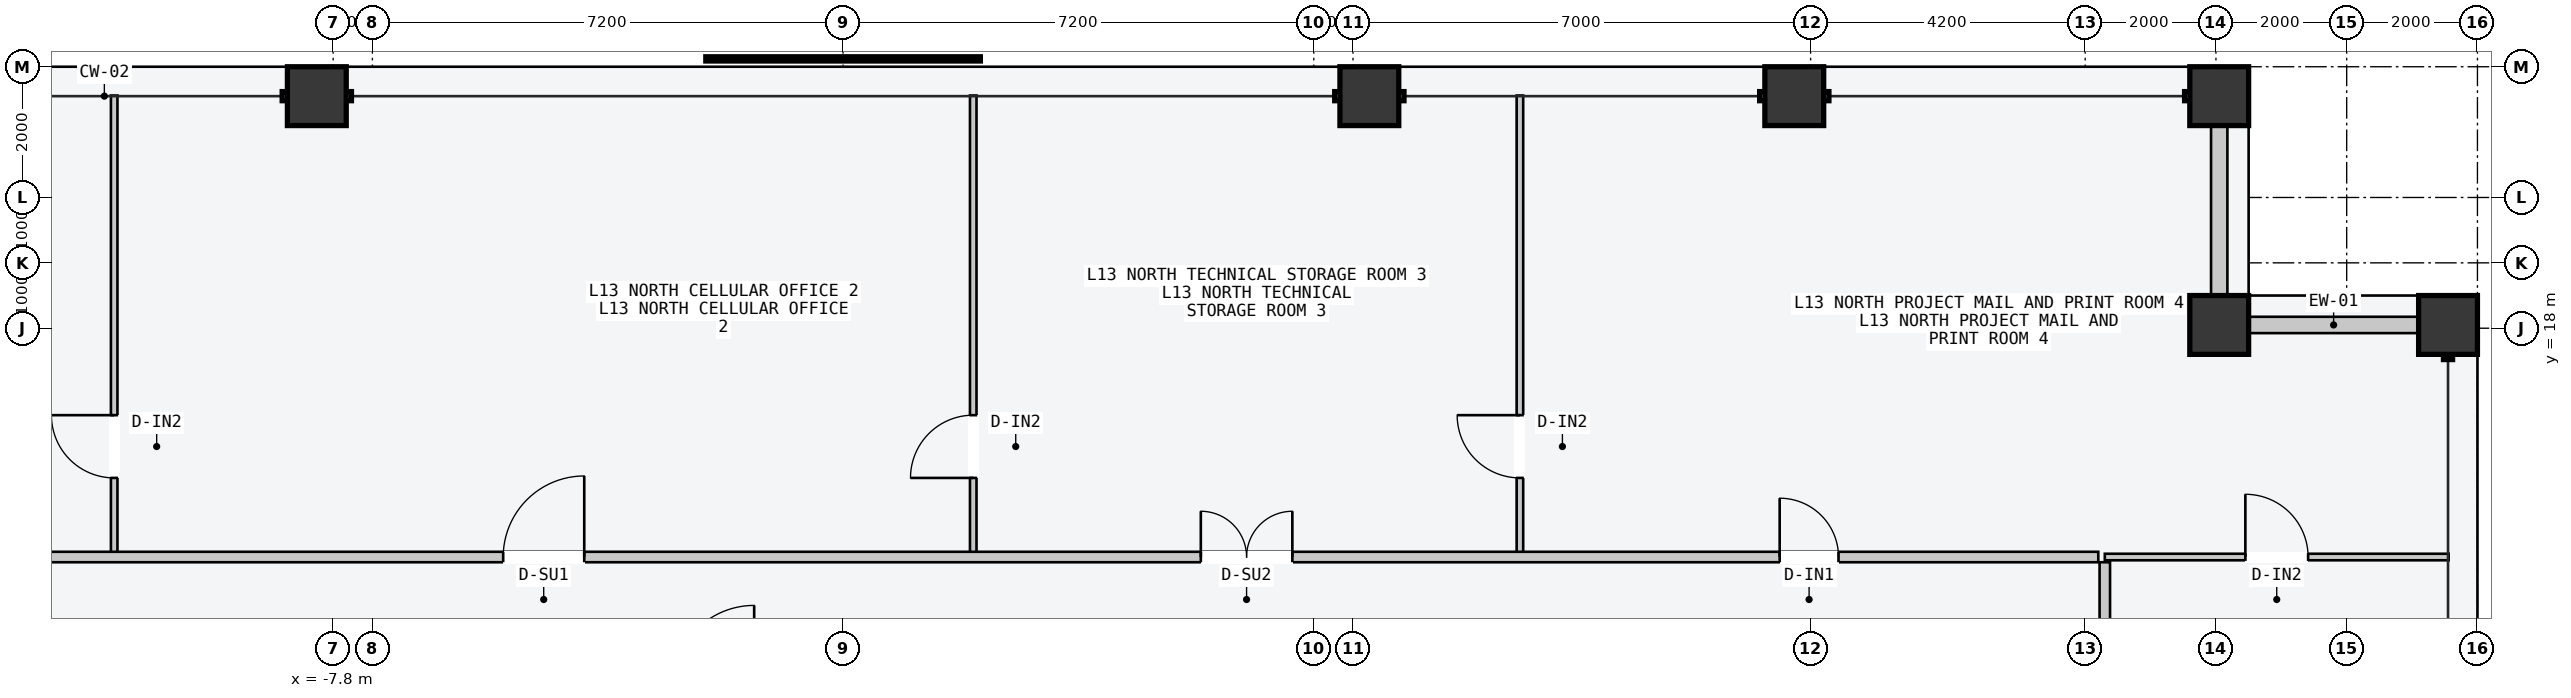
"""IFC4 building model, lengths in metres.
Left out: names, types, materials, properties, quantities, classifications, styles, units other than length and angle.
Written with IfcOpenShell. Run it as: python <this file> out.ifc"""

import sys

from ifc_helpers import new_model, si_unit, direction, frame, frame_2d, origin, origin_2d, place, context, subcontext, project, spatial, rectangle, hollow_rectangle, extrude, element, fill, save


model = new_model("IFC4")
c1 = context("Model", 3, precision=1e-05, world=origin(), true_north=direction((0.0, 1.0)))
c2 = subcontext(c1, "Body", "Model", "MODEL_VIEW")
j1 = project(units=[si_unit("LENGTHUNIT", "METRE"), si_unit("PLANEANGLEUNIT", "RADIAN")], contexts=[c1])
p1 = place(None, origin())
s1 = spatial("IfcSite", under=j1, at=p1, CompositionType="ELEMENT")
p2 = place(p1, origin())
s2 = spatial("IfcBuilding", under=s1, at=p2, CompositionType="ELEMENT")
p3 = place(p2, frame((0.0, 0.0, 52.8)))
s3 = spatial("IfcBuildingStorey", under=s2, at=p3, CompositionType="ELEMENT", Elevation=52.8)
for number, where, z_axis, x_axis in (
    (1, (-8.05, 21.55, 0.0), (0.0, 0.0, 1.0), (1.0, 0.0, 0.0)),
    (2, (8.05, 21.55, 0.0), (0.0, 0.0, 1.0), (1.0, 0.0, 0.0)),
    (3, (14.55, 21.55, 0.0), (0.0, 0.0, 1.0), (1.0, 0.0, 0.0)),
    (4, (21.05, 21.55, 0.0), (0.0, 0.0, 1.0), (1.0, 0.0, 0.0)),
    (5, (24.55, 18.05, 0.0), (0.0, 0.0, 1.0), (0.0, 1.0, 0.0)),
    (6, (21.05, 18.05, 0.0), (0.0, 0.0, 1.0), (1.0, 0.0, 0.0)),
):
    element("IfcColumn", number, at=place(p3, frame(where, z_axis=z_axis, x_axis=x_axis)), inside=s3, PredefinedType="COLUMN", context=c2, shape_type="SweptSolid", body=[
        extrude(hollow_rectangle(XDim=0.9, YDim=0.9, WallThickness=0.045, at=origin_2d()), origin(), (0.0, 0.0, 1.0), 3.6),
    ])
for number, where, z_axis, x_axis in (
    (7, (21.51, 18.05, 0.0), (0.0, 0.0, 1.0), (1.0, 0.0, 0.0)),
    (8, (21.05, 18.51, 0.0), (0.0, 0.0, 1.0), (0.0, 1.0, 0.0)),
):
    element("IfcWall", number, at=place(p3, frame(where, z_axis=z_axis, x_axis=x_axis)), inside=s3, PredefinedType="STANDARD", context=c2, shape_type="SweptSolid", body=[
        extrude(rectangle(XDim=2.58, YDim=0.25, at=frame_2d((1.29, 0.0))), origin(), (0.0, 0.0, 1.0), 2.7),
    ])
p4 = place(p3, frame((-11.15, 14.56, 0.0), z_axis=(0.0, 0.0, 1.0), x_axis=(0.0, 1.0, 0.0)))
e9 = element("IfcWall", 9, at=p4, inside=s3, PredefinedType="PARTITIONING", context=c2, shape_type="SweptSolid", body=[
    extrude(rectangle(XDim=7.0, YDim=0.1, at=frame_2d((3.5, 0.0))), origin(), (0.0, 0.0, 1.0), 3.4),
])
p5 = place(p4, frame((1.15, 0.0, 0.0)))
e10 = element("IfcOpeningElement", 10, at=p5, cuts=e9, PredefinedType="OPENING", context=c2, shape_type="SweptSolid", body=[
    extrude(rectangle(XDim=0.96, YDim=2.18, at=frame_2d((0.48, 1.09))), frame((0.0, 0.06, 0.0), z_axis=(0.0, -1.0, 0.0), x_axis=(1.0, 0.0, 0.0)), (0.0, 0.0, 1.0), 0.12),
])
p6 = place(p3, frame((1.991, 14.56, 0.0), z_axis=(0.0, 0.0, 1.0), x_axis=(0.0, 1.0, 0.0)))
e11 = element("IfcWall", 11, at=p6, inside=s3, PredefinedType="PARTITIONING", context=c2, shape_type="SweptSolid", body=[
    extrude(rectangle(XDim=7.0, YDim=0.1, at=frame_2d((3.5, 0.0))), origin(), (0.0, 0.0, 1.0), 3.4),
])
p7 = place(p6, frame((1.15, 0.0, 0.0)))
e12 = element("IfcOpeningElement", 12, at=p7, cuts=e11, PredefinedType="OPENING", context=c2, shape_type="SweptSolid", body=[
    extrude(rectangle(XDim=0.96, YDim=2.18, at=frame_2d((0.48, 1.09))), frame((0.0, 0.06, 0.0), z_axis=(0.0, -1.0, 0.0), x_axis=(1.0, 0.0, 0.0)), (0.0, 0.0, 1.0), 0.12),
])
p8 = place(p3, frame((10.353, 14.56, 0.0), z_axis=(0.0, 0.0, 1.0), x_axis=(0.0, 1.0, 0.0)))
e13 = element("IfcWall", 13, at=p8, inside=s3, PredefinedType="PARTITIONING", context=c2, shape_type="SweptSolid", body=[
    extrude(rectangle(XDim=7.0, YDim=0.1, at=frame_2d((3.5, 0.0))), origin(), (0.0, 0.0, 1.0), 3.4),
])
p9 = place(p8, frame((1.15, 0.0, 0.0)))
e14 = element("IfcOpeningElement", 14, at=p9, cuts=e13, PredefinedType="OPENING", context=c2, shape_type="SweptSolid", body=[
    extrude(rectangle(XDim=0.96, YDim=2.18, at=frame_2d((0.48, 1.09))), frame((0.0, 0.06, 0.0), z_axis=(0.0, -1.0, 0.0), x_axis=(1.0, 0.0, 0.0)), (0.0, 0.0, 1.0), 0.12),
])
p10 = place(p3, frame((-19.2, 14.5, 0.0), z_axis=(0.0, 0.0, 1.0), x_axis=(1.0, 0.0, 0.0)))
e15 = element("IfcWall", 15, at=p10, inside=s3, PredefinedType="PARTITIONING", context=c2, shape_type="SweptSolid", body=[
    extrude(rectangle(XDim=38.4, YDim=0.16, at=frame_2d((19.2, 0.0))), origin(), (0.0, 0.0, 1.0), 3.4),
])
p11 = place(p10, frame((3.495, 0.0, 0.0)))
e16 = element("IfcOpeningElement", 16, at=p11, cuts=e15, PredefinedType="OPENING", context=c2, shape_type="SweptSolid", body=[
    extrude(rectangle(XDim=1.06, YDim=2.2, at=frame_2d((0.53, 1.1))), frame((0.0, 0.09, 0.0), z_axis=(0.0, -1.0, 0.0), x_axis=(1.0, 0.0, 0.0)), (0.0, 0.0, 1.0), 0.18),
])
p12 = place(p10, frame((14.001, 0.0, 0.0)))
e17 = element("IfcOpeningElement", 17, at=p12, cuts=e15, PredefinedType="OPENING", context=c2, shape_type="SweptSolid", body=[
    extrude(rectangle(XDim=1.24, YDim=2.24, at=frame_2d((0.62, 1.12))), frame((0.0, 0.09, 0.0), z_axis=(0.0, -1.0, 0.0), x_axis=(1.0, 0.0, 0.0)), (0.0, 0.0, 1.0), 0.18),
])
p13 = place(p10, frame((24.672, 0.0, 0.0)))
e18 = element("IfcOpeningElement", 18, at=p13, cuts=e15, PredefinedType="OPENING", context=c2, shape_type="SweptSolid", body=[
    extrude(rectangle(XDim=1.4, YDim=2.2, at=frame_2d((0.7, 1.1))), frame((0.0, 0.09, 0.0), z_axis=(0.0, -1.0, 0.0), x_axis=(1.0, 0.0, 0.0)), (0.0, 0.0, 1.0), 0.18),
])
p14 = place(p10, frame((33.527, 0.0, 0.0)))
e19 = element("IfcOpeningElement", 19, at=p14, cuts=e15, PredefinedType="OPENING", context=c2, shape_type="SweptSolid", body=[
    extrude(rectangle(XDim=0.9, YDim=2.15, at=frame_2d((0.45, 1.075))), frame((0.0, 0.09, 0.0), z_axis=(0.0, -1.0, 0.0), x_axis=(1.0, 0.0, 0.0)), (0.0, 0.0, 1.0), 0.18),
])
p15 = place(p3, frame((19.3, 14.5, 0.0), z_axis=(0.0, 0.0, 1.0), x_axis=(1.0, 0.0, 0.0)))
e20 = element("IfcWall", 20, at=p15, inside=s3, PredefinedType="PARTITIONING", context=c2, shape_type="SweptSolid", body=[
    extrude(rectangle(XDim=5.26, YDim=0.1, at=frame_2d((2.63, 0.0))), origin(), (0.0, 0.0, 1.0), 3.4),
])
p16 = place(p15, frame((2.15, 0.0, 0.0)))
e21 = element("IfcOpeningElement", 21, at=p16, cuts=e20, PredefinedType="OPENING", context=c2, shape_type="SweptSolid", body=[
    extrude(rectangle(XDim=0.96, YDim=2.18, at=frame_2d((0.48, 1.09))), frame((0.0, 0.06, 0.0), z_axis=(0.0, -1.0, 0.0), x_axis=(1.0, 0.0, 0.0)), (0.0, 0.0, 1.0), 0.12),
])
p17 = place(p3, frame((19.3, -12.12, 0.0), z_axis=(0.0, 0.0, 1.0), x_axis=(0.0, 1.0, 0.0)))
e22 = element("IfcWall", 22, at=p17, inside=s3, PredefinedType="PARTITIONING", context=c2, shape_type="SweptSolid", body=[
    extrude(rectangle(XDim=26.54, YDim=0.16, at=frame_2d((13.27, 0.0))), origin(), (0.0, 0.0, 1.0), 3.4),
])
p18 = place(p17, frame((4.953, 0.0, 0.0)))
e23 = element("IfcOpeningElement", 23, at=p18, cuts=e22, PredefinedType="OPENING", context=c2, shape_type="SweptSolid", body=[
    extrude(rectangle(XDim=1.24, YDim=2.24, at=frame_2d((0.62, 1.12))), frame((0.0, 0.09, 0.0), z_axis=(0.0, -1.0, 0.0), x_axis=(1.0, 0.0, 0.0)), (0.0, 0.0, 1.0), 0.18),
])
p19 = place(p17, frame((18.143, 0.0, 0.0)))
e24 = element("IfcOpeningElement", 24, at=p19, cuts=e22, PredefinedType="OPENING", context=c2, shape_type="SweptSolid", body=[
    extrude(rectangle(XDim=1.4, YDim=2.2, at=frame_2d((0.7, 1.1))), frame((0.0, 0.09, 0.0), z_axis=(0.0, -1.0, 0.0), x_axis=(1.0, 0.0, 0.0)), (0.0, 0.0, 1.0), 0.18),
])
p20 = place(p5, origin())
e25 = element("IfcDoor", 25, at=p20, inside=s3, OperationType="SINGLE_SWING_RIGHT", PredefinedType="DOOR", context=c2, shape_type="SweptSolid", body=[
    extrude(rectangle(XDim=0.96, YDim=2.18, at=frame_2d((0.48, 1.09))), frame((0.0, 0.025, 0.0), z_axis=(0.0, -1.0, 0.0), x_axis=(1.0, 0.0, 0.0)), (0.0, 0.0, 1.0), 0.05),
])
fill(e10, e25)
p21 = place(p7, origin())
e26 = element("IfcDoor", 26, at=p21, inside=s3, OperationType="SINGLE_SWING_LEFT", PredefinedType="DOOR", context=c2, shape_type="SweptSolid", body=[
    extrude(rectangle(XDim=0.96, YDim=2.18, at=frame_2d((0.48, 1.09))), frame((0.0, 0.025, 0.0), z_axis=(0.0, -1.0, 0.0), x_axis=(1.0, 0.0, 0.0)), (0.0, 0.0, 1.0), 0.05),
])
fill(e12, e26)
p22 = place(p9, origin())
e27 = element("IfcDoor", 27, at=p22, inside=s3, OperationType="SINGLE_SWING_RIGHT", PredefinedType="DOOR", context=c2, shape_type="SweptSolid", body=[
    extrude(rectangle(XDim=0.96, YDim=2.18, at=frame_2d((0.48, 1.09))), frame((0.0, 0.025, 0.0), z_axis=(0.0, -1.0, 0.0), x_axis=(1.0, 0.0, 0.0)), (0.0, 0.0, 1.0), 0.05),
])
fill(e14, e27)
p23 = place(p12, origin())
e28 = element("IfcDoor", 28, at=p23, inside=s3, OperationType="SINGLE_SWING_RIGHT", PredefinedType="DOOR", context=c2, shape_type="SweptSolid", body=[
    extrude(rectangle(XDim=1.24, YDim=2.24, at=frame_2d((0.62, 1.12))), frame((0.0, 0.025, 0.0), z_axis=(0.0, -1.0, 0.0), x_axis=(1.0, 0.0, 0.0)), (0.0, 0.0, 1.0), 0.05),
])
fill(e17, e28)
p24 = place(p13, origin())
e29 = element("IfcDoor", 29, at=p24, inside=s3, OperationType="DOUBLE_DOOR_SINGLE_SWING", PredefinedType="DOOR", context=c2, shape_type="SweptSolid", body=[
    extrude(rectangle(XDim=1.4, YDim=2.2, at=frame_2d((0.7, 1.1))), frame((0.0, 0.025, 0.0), z_axis=(0.0, -1.0, 0.0), x_axis=(1.0, 0.0, 0.0)), (0.0, 0.0, 1.0), 0.05),
])
fill(e18, e29)
p25 = place(p14, origin())
e30 = element("IfcDoor", 30, at=p25, inside=s3, OperationType="SINGLE_SWING_LEFT", PredefinedType="DOOR", context=c2, shape_type="SweptSolid", body=[
    extrude(rectangle(XDim=0.9, YDim=2.15, at=frame_2d((0.45, 1.075))), frame((0.0, 0.025, 0.0), z_axis=(0.0, -1.0, 0.0), x_axis=(1.0, 0.0, 0.0)), (0.0, 0.0, 1.0), 0.05),
])
fill(e19, e30)
p26 = place(p16, origin())
e31 = element("IfcDoor", 31, at=p26, inside=s3, OperationType="SINGLE_SWING_LEFT", PredefinedType="DOOR", context=c2, shape_type="SweptSolid", body=[
    extrude(rectangle(XDim=0.96, YDim=2.18, at=frame_2d((0.48, 1.09))), frame((0.0, 0.025, 0.0), z_axis=(0.0, -1.0, 0.0), x_axis=(1.0, 0.0, 0.0)), (0.0, 0.0, 1.0), 0.05),
])
fill(e21, e31)
save(model, sys.argv[1])
